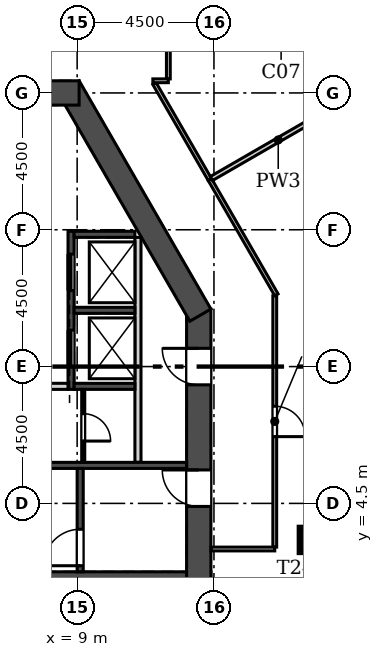
"""IFC4 building model, lengths in metres.
Left out: names, types, materials, properties, quantities, classifications, styles, units other than length and angle.
Written with IfcOpenShell. Run it as: python <this file> out.ifc"""

import sys

from ifc_helpers import new_model, si_unit, direction, frame, frame_2d, origin, origin_2d, place, context, subcontext, project, spatial, rectangle, extrude, element, fill, save


model = new_model("IFC4")
c1 = context("Model", 3, precision=1e-05, world=origin(), true_north=direction((0.0, 1.0)))
c2 = subcontext(c1, "Body", "Model", "MODEL_VIEW")
j1 = project(units=[si_unit("LENGTHUNIT", "METRE"), si_unit("PLANEANGLEUNIT", "RADIAN")], contexts=[c1])
p1 = place(None, origin())
s1 = spatial("IfcSite", under=j1, at=p1, CompositionType="ELEMENT")
p2 = place(p1, origin())
s2 = spatial("IfcBuilding", under=s1, at=p2, CompositionType="ELEMENT")
p3 = place(p2, frame((0.0, 0.0, 335.1)))
s3 = spatial("IfcBuildingStorey", under=s2, at=p3, CompositionType="ELEMENT", Elevation=335.1)
p4 = place(p3, frame((16.721, 3.299, 0.0), z_axis=(0.0, 0.0, 1.0), x_axis=(1.0, 0.0, 0.0)))
e1 = element("IfcColumn", 1, at=p4, inside=s3, PredefinedType="COLUMN", context=c2, shape_type="SweptSolid", body=[
    extrude(rectangle(XDim=0.8, YDim=0.8, at=origin_2d()), origin(), (0.0, 0.0, 1.0), 4.2),
])
p5 = place(p3, frame((-13.4, 1.85, 0.0), z_axis=(0.0, 0.0, 1.0), x_axis=(1.0, 0.0, 0.0)))
e2 = element("IfcWall", 2, at=p5, inside=s3, PredefinedType="SHEAR", context=c2, shape_type="SweptSolid", body=[
    extrude(rectangle(XDim=26.8, YDim=0.8, at=frame_2d((13.4, 0.0))), origin(), (0.0, 0.0, 1.0), 4.2),
])
p6 = place(p3, frame((13.0, 1.45, 0.0), z_axis=(0.0, 0.0, 1.0), x_axis=(0.0, 1.0, 0.0)))
e3 = element("IfcWall", 3, at=p6, inside=s3, PredefinedType="SHEAR", context=c2, shape_type="SweptSolid", body=[
    extrude(rectangle(XDim=9.442, YDim=0.8, at=frame_2d((4.721, 0.0))), origin(), (0.0, 0.0, 1.0), 4.2),
])
p7 = place(p6, frame((2.95, 0.0, 0.0)))
e4 = element("IfcOpeningElement", 4, at=p7, cuts=e3, PredefinedType="OPENING", context=c2, shape_type="SweptSolid", body=[
    extrude(rectangle(XDim=1.2, YDim=2.1, at=frame_2d((0.6, 1.05))), frame((0.0, 0.41, 0.0), z_axis=(0.0, -1.0, 0.0), x_axis=(1.0, 0.0, 0.0)), (0.0, 0.0, 1.0), 0.82),
])
p8 = place(p6, frame((6.95, 0.0, 0.0)))
e5 = element("IfcOpeningElement", 5, at=p8, cuts=e3, PredefinedType="OPENING", context=c2, shape_type="SweptSolid", body=[
    extrude(rectangle(XDim=1.2, YDim=2.1, at=frame_2d((0.6, 1.05))), frame((0.0, 0.41, 0.0), z_axis=(0.0, -1.0, 0.0), x_axis=(1.0, 0.0, 0.0)), (0.0, 0.0, 1.0), 0.82),
])
p9 = place(p3, frame((13.054, 10.692, 0.0), z_axis=(0.0, 0.0, 1.0), x_axis=(-0.500015780397, 0.866016292776, 0.0)))
e6 = element("IfcWall", 6, at=p9, inside=s3, PredefinedType="SHEAR", context=c2, shape_type="SweptSolid", body=[
    extrude(rectangle(XDim=8.67, YDim=0.8, at=frame_2d((4.335, 0.0))), origin(), (0.0, 0.0, 1.0), 4.2),
])
p10 = place(p3, frame((9.065, 18.0, 0.0), z_axis=(0.0, 0.0, 1.0), x_axis=(-1.0, 0.0, 0.0)))
e7 = element("IfcWall", 7, at=p10, inside=s3, PredefinedType="SHEAR", context=c2, shape_type="SweptSolid", body=[
    extrude(rectangle(XDim=18.13, YDim=0.8, at=frame_2d((9.065, 0.0))), origin(), (0.0, 0.0, 1.0), 4.2),
])
p11 = place(p10, frame((8.365, 0.0, 0.0)))
e8 = element("IfcOpeningElement", 8, at=p11, cuts=e7, PredefinedType="OPENING", context=c2, shape_type="SweptSolid", body=[
    extrude(rectangle(XDim=1.4, YDim=2.1, at=frame_2d((0.7, 1.05))), frame((0.0, 0.41, 0.0), z_axis=(0.0, -1.0, 0.0), x_axis=(1.0, 0.0, 0.0)), (0.0, 0.0, 1.0), 0.82),
])
p12 = place(p10, frame((11.065, 0.0, 0.0)))
e9 = element("IfcOpeningElement", 9, at=p12, cuts=e7, PredefinedType="OPENING", context=c2, shape_type="SweptSolid", body=[
    extrude(rectangle(XDim=6.0, YDim=2.4, at=frame_2d((3.0, 1.2))), frame((0.0, 0.41, 0.0), z_axis=(0.0, -1.0, 0.0), x_axis=(1.0, 0.0, 0.0)), (0.0, 0.0, 1.0), 0.82),
])
p13 = place(p10, frame((1.065, 0.0, 0.0)))
e10 = element("IfcOpeningElement", 10, at=p13, cuts=e7, PredefinedType="OPENING", context=c2, shape_type="SweptSolid", body=[
    extrude(rectangle(XDim=6.0, YDim=2.4, at=frame_2d((3.0, 1.2))), frame((0.0, 0.41, 0.0), z_axis=(0.0, -1.0, 0.0), x_axis=(1.0, 0.0, 0.0)), (0.0, 0.0, 1.0), 0.82),
])
p14 = place(p3, frame((23.788, 7.709, 0.0), z_axis=(0.0, 0.0, 1.0), x_axis=(-0.500001731347, 0.866024404189, 0.0)))
e11 = element("IfcWall", 11, at=p14, inside=s3, PredefinedType="SOLIDWALL", context=c2, shape_type="SweptSolid", body=[
    extrude(rectangle(XDim=38.87, YDim=0.34, at=frame_2d((19.435, 0.0))), origin(), (0.0, 0.0, 1.0), 3.8),
])
p15 = place(p14, frame((3.218, 0.0, 0.9)))
e12 = element("IfcOpeningElement", 12, at=p15, cuts=e11, PredefinedType="OPENING", context=c2, shape_type="SweptSolid", body=[
    extrude(rectangle(XDim=1.885, YDim=2.6, at=frame_2d((0.942, 1.3))), frame((0.0, 0.18, 0.0), z_axis=(0.0, -1.0, 0.0), x_axis=(1.0, 0.0, 0.0)), (0.0, 0.0, 1.0), 0.36),
])
p16 = place(p14, frame((6.218, 0.0, 0.9)))
e13 = element("IfcOpeningElement", 13, at=p16, cuts=e11, PredefinedType="OPENING", context=c2, shape_type="SweptSolid", body=[
    extrude(rectangle(XDim=1.885, YDim=2.6, at=frame_2d((0.942, 1.3))), frame((0.0, 0.18, 0.0), z_axis=(0.0, -1.0, 0.0), x_axis=(1.0, 0.0, 0.0)), (0.0, 0.0, 1.0), 0.36),
])
p17 = place(p14, frame((9.218, 0.0, 0.9)))
e14 = element("IfcOpeningElement", 14, at=p17, cuts=e11, PredefinedType="OPENING", context=c2, shape_type="SweptSolid", body=[
    extrude(rectangle(XDim=1.885, YDim=2.6, at=frame_2d((0.942, 1.3))), frame((0.0, 0.18, 0.0), z_axis=(0.0, -1.0, 0.0), x_axis=(1.0, 0.0, 0.0)), (0.0, 0.0, 1.0), 0.36),
])
p18 = place(p14, frame((12.218, 0.0, 0.9)))
e15 = element("IfcOpeningElement", 15, at=p18, cuts=e11, PredefinedType="OPENING", context=c2, shape_type="SweptSolid", body=[
    extrude(rectangle(XDim=1.885, YDim=2.6, at=frame_2d((0.942, 1.3))), frame((0.0, 0.18, 0.0), z_axis=(0.0, -1.0, 0.0), x_axis=(1.0, 0.0, 0.0)), (0.0, 0.0, 1.0), 0.36),
])
p19 = place(p14, frame((15.218, 0.0, 0.9)))
e16 = element("IfcOpeningElement", 16, at=p19, cuts=e11, PredefinedType="OPENING", context=c2, shape_type="SweptSolid", body=[
    extrude(rectangle(XDim=1.885, YDim=2.6, at=frame_2d((0.942, 1.3))), frame((0.0, 0.18, 0.0), z_axis=(0.0, -1.0, 0.0), x_axis=(1.0, 0.0, 0.0)), (0.0, 0.0, 1.0), 0.36),
])
p20 = place(p14, frame((18.218, 0.0, 0.9)))
e17 = element("IfcOpeningElement", 17, at=p20, cuts=e11, PredefinedType="OPENING", context=c2, shape_type="SweptSolid", body=[
    extrude(rectangle(XDim=1.885, YDim=2.6, at=frame_2d((0.942, 1.3))), frame((0.0, 0.18, 0.0), z_axis=(0.0, -1.0, 0.0), x_axis=(1.0, 0.0, 0.0)), (0.0, 0.0, 1.0), 0.36),
])
p21 = place(p14, frame((21.218, 0.0, 0.9)))
e18 = element("IfcOpeningElement", 18, at=p21, cuts=e11, PredefinedType="OPENING", context=c2, shape_type="SweptSolid", body=[
    extrude(rectangle(XDim=1.885, YDim=2.6, at=frame_2d((0.942, 1.3))), frame((0.0, 0.18, 0.0), z_axis=(0.0, -1.0, 0.0), x_axis=(1.0, 0.0, 0.0)), (0.0, 0.0, 1.0), 0.36),
])
p22 = place(p14, frame((24.218, 0.0, 0.9)))
e19 = element("IfcOpeningElement", 19, at=p22, cuts=e11, PredefinedType="OPENING", context=c2, shape_type="SweptSolid", body=[
    extrude(rectangle(XDim=1.885, YDim=2.6, at=frame_2d((0.942, 1.3))), frame((0.0, 0.18, 0.0), z_axis=(0.0, -1.0, 0.0), x_axis=(1.0, 0.0, 0.0)), (0.0, 0.0, 1.0), 0.36),
])
p23 = place(p14, frame((27.218, 0.0, 0.9)))
e20 = element("IfcOpeningElement", 20, at=p23, cuts=e11, PredefinedType="OPENING", context=c2, shape_type="SweptSolid", body=[
    extrude(rectangle(XDim=1.885, YDim=2.6, at=frame_2d((0.942, 1.3))), frame((0.0, 0.18, 0.0), z_axis=(0.0, -1.0, 0.0), x_axis=(1.0, 0.0, 0.0)), (0.0, 0.0, 1.0), 0.36),
])
p24 = place(p14, frame((30.218, 0.0, 0.9)))
e21 = element("IfcOpeningElement", 21, at=p24, cuts=e11, PredefinedType="OPENING", context=c2, shape_type="SweptSolid", body=[
    extrude(rectangle(XDim=1.885, YDim=2.6, at=frame_2d((0.942, 1.3))), frame((0.0, 0.18, 0.0), z_axis=(0.0, -1.0, 0.0), x_axis=(1.0, 0.0, 0.0)), (0.0, 0.0, 1.0), 0.36),
])
p25 = place(p14, frame((33.218, 0.0, 0.9)))
e22 = element("IfcOpeningElement", 22, at=p25, cuts=e11, PredefinedType="OPENING", context=c2, shape_type="SweptSolid", body=[
    extrude(rectangle(XDim=1.885, YDim=2.6, at=frame_2d((0.942, 1.3))), frame((0.0, 0.18, 0.0), z_axis=(0.0, -1.0, 0.0), x_axis=(1.0, 0.0, 0.0)), (0.0, 0.0, 1.0), 0.36),
])
p26 = place(p14, frame((1.051, 0.0, 0.9)))
e23 = element("IfcOpeningElement", 23, at=p26, cuts=e11, PredefinedType="OPENING", context=c2, shape_type="SweptSolid", body=[
    extrude(rectangle(XDim=1.115, YDim=2.4, at=frame_2d((0.558, 1.2))), frame((0.0, 0.18, 0.0), z_axis=(0.0, -1.0, 0.0), x_axis=(1.0, 0.0, 0.0)), (0.0, 0.0, 1.0), 0.36),
])
p27 = place(p14, frame((36.429, 0.0, 0.9)))
e24 = element("IfcOpeningElement", 24, at=p27, cuts=e11, PredefinedType="OPENING", context=c2, shape_type="SweptSolid", body=[
    extrude(rectangle(XDim=1.115, YDim=2.4, at=frame_2d((0.558, 1.2))), frame((0.0, 0.18, 0.0), z_axis=(0.0, -1.0, 0.0), x_axis=(1.0, 0.0, 0.0)), (0.0, 0.0, 1.0), 0.36),
])
p28 = place(p3, frame((11.0, 5.85, 0.0), z_axis=(0.0, 0.0, 1.0), x_axis=(0.0, 1.0, 0.0)))
e25 = element("IfcWall", 25, at=p28, inside=s3, PredefinedType="SOLIDWALL", context=c2, shape_type="SweptSolid", body=[
    extrude(rectangle(XDim=7.4, YDim=0.2, at=frame_2d((3.7, 0.0))), origin(), (0.0, 0.0, 1.0), 3.8),
])
p29 = place(p3, frame((8.8, 8.25, -0.4), z_axis=(0.0, 0.0, 1.0), x_axis=(0.0, 1.0, 0.0)))
e26 = element("IfcWall", 26, at=p29, inside=s3, PredefinedType="SOLIDWALL", context=c2, shape_type="SweptSolid", body=[
    extrude(rectangle(XDim=5.2, YDim=0.2, at=frame_2d((2.6, 0.0))), origin(), (0.0, 0.0, 1.0), 4.2),
])
p30 = place(p29, frame((0.75, 0.0, 0.4)))
e27 = element("IfcOpeningElement", 27, at=p30, cuts=e26, PredefinedType="OPENING", context=c2, shape_type="SweptSolid", body=[
    extrude(rectangle(XDim=1.2, YDim=2.1, at=frame_2d((0.6, 1.05))), frame((0.0, 0.11, 0.0), z_axis=(0.0, -1.0, 0.0), x_axis=(1.0, 0.0, 0.0)), (0.0, 0.0, 1.0), 0.22),
])
p31 = place(p29, frame((3.25, 0.0, 0.4)))
e28 = element("IfcOpeningElement", 28, at=p31, cuts=e26, PredefinedType="OPENING", context=c2, shape_type="SweptSolid", body=[
    extrude(rectangle(XDim=1.2, YDim=2.1, at=frame_2d((0.6, 1.05))), frame((0.0, 0.11, 0.0), z_axis=(0.0, -1.0, 0.0), x_axis=(1.0, 0.0, 0.0)), (0.0, 0.0, 1.0), 0.22),
])
p32 = place(p3, frame((8.9, 8.35, -0.4), z_axis=(0.0, 0.0, 1.0), x_axis=(1.0, 0.0, 0.0)))
e29 = element("IfcWall", 29, at=p32, inside=s3, PredefinedType="SOLIDWALL", context=c2, shape_type="SweptSolid", body=[
    extrude(rectangle(XDim=2.0, YDim=0.2, at=frame_2d((1.0, 0.0))), origin(), (0.0, 0.0, 1.0), 4.2),
])
p33 = place(p3, frame((1.2, 5.75, -0.4), z_axis=(0.0, 0.0, 1.0), x_axis=(1.0, 0.0, 0.0)))
e30 = element("IfcWall", 30, at=p33, inside=s3, PredefinedType="SOLIDWALL", context=c2, shape_type="SweptSolid", body=[
    extrude(rectangle(XDim=11.4, YDim=0.2, at=frame_2d((5.7, 0.0))), origin(), (0.0, 0.0, 1.0), 4.2),
])
p34 = place(p3, frame((9.1, 2.25, -0.4), z_axis=(0.0, 0.0, 1.0), x_axis=(0.0, 1.0, 0.0)))
e31 = element("IfcWall", 31, at=p34, inside=s3, PredefinedType="SOLIDWALL", context=c2, shape_type="SweptSolid", body=[
    extrude(rectangle(XDim=3.4, YDim=0.2, at=frame_2d((1.7, 0.0))), origin(), (0.0, 0.0, 1.0), 4.2),
])
p35 = place(p34, frame((0.2, 0.0, 0.4)))
e32 = element("IfcOpeningElement", 32, at=p35, cuts=e31, PredefinedType="OPENING", context=c2, shape_type="SweptSolid", body=[
    extrude(rectangle(XDim=1.2, YDim=2.1, at=frame_2d((0.6, 1.05))), frame((0.0, 0.11, 0.0), z_axis=(0.0, -1.0, 0.0), x_axis=(1.0, 0.0, 0.0)), (0.0, 0.0, 1.0), 0.22),
])
for number, where, z_axis, x_axis in (
    (33, (8.9, 10.85, -0.4), (0.0, 0.0, 1.0), (1.0, 0.0, 0.0)),
    (34, (8.9, 13.35, -0.4), (0.0, 0.0, 1.0), (1.0, 0.0, 0.0)),
):
    element("IfcWall", number, at=place(p3, frame(where, z_axis=z_axis, x_axis=x_axis)), inside=s3, PredefinedType="SOLIDWALL", context=c2, shape_type="SweptSolid", body=[
        extrude(rectangle(XDim=2.0, YDim=0.2, at=frame_2d((1.0, 0.0))), origin(), (0.0, 0.0, 1.0), 4.2),
    ])
p36 = place(p3, frame((9.2, 5.85, 0.0), z_axis=(0.0, 0.0, 1.0), x_axis=(0.0, 1.0, 0.0)))
e35 = element("IfcWall", 35, at=p36, inside=s3, PredefinedType="PARTITIONING", context=c2, shape_type="SweptSolid", body=[
    extrude(rectangle(XDim=2.4, YDim=0.1, at=frame_2d((1.2, 0.0))), origin(), (0.0, 0.0, 1.0), 3.8),
])
p37 = place(p36, frame((0.7, 0.0, 0.0)))
e36 = element("IfcOpeningElement", 36, at=p37, cuts=e35, PredefinedType="OPENING", context=c2, shape_type="SweptSolid", body=[
    extrude(rectangle(XDim=0.9, YDim=2.1, at=frame_2d((0.45, 1.05))), frame((0.0, 0.06, 0.0), z_axis=(0.0, -1.0, 0.0), x_axis=(1.0, 0.0, 0.0)), (0.0, 0.0, 1.0), 0.12),
])
p38 = place(p3, frame((5.9, 8.35, 0.0), z_axis=(0.0, 0.0, 1.0), x_axis=(1.0, 0.0, 0.0)))
e37 = element("IfcWall", 37, at=p38, inside=s3, PredefinedType="SOLIDWALL", context=c2, shape_type="SweptSolid", body=[
    extrude(rectangle(XDim=2.8, YDim=0.2, at=frame_2d((1.4, 0.0))), origin(), (0.0, 0.0, 1.0), 3.8),
])
p39 = place(p38, frame((0.9, 0.0, 0.0)))
e38 = element("IfcOpeningElement", 38, at=p39, cuts=e37, PredefinedType="OPENING", context=c2, shape_type="SweptSolid", body=[
    extrude(rectangle(XDim=1.0, YDim=2.1, at=frame_2d((0.5, 1.05))), frame((0.0, 0.11, 0.0), z_axis=(0.0, -1.0, 0.0), x_axis=(1.0, 0.0, 0.0)), (0.0, 0.0, 1.0), 0.22),
])
p40 = place(p3, frame((11.544, 18.306, 0.0), z_axis=(0.0, 0.0, 1.0), x_axis=(0.500007048974, -0.866021334019, 0.0)))
e39 = element("IfcWall", 39, at=p40, inside=s3, PredefinedType="PARTITIONING", context=c2, shape_type="SweptSolid", body=[
    extrude(rectangle(XDim=3.639, YDim=0.125, at=frame_2d((1.819, 0.0))), origin(), (0.0, 0.0, 1.0), 3.8),
])
p41 = place(p3, frame((13.364, 15.155, 0.0), z_axis=(0.0, 0.0, 1.0), x_axis=(0.499974900732, -0.866039894369, 0.0)))
e40 = element("IfcWall", 40, at=p41, inside=s3, PredefinedType="PARTITIONING", context=c2, shape_type="SweptSolid", body=[
    extrude(rectangle(XDim=4.381, YDim=0.125, at=frame_2d((2.19, 0.0))), origin(), (0.0, 0.0, 1.0), 3.8),
])
p42 = place(p3, frame((15.5, 11.33, 0.0), z_axis=(0.0, 0.0, 1.0), x_axis=(0.0, -1.0, 0.0)))
e41 = element("IfcWall", 41, at=p42, inside=s3, PredefinedType="PARTITIONING", context=c2, shape_type="SweptSolid", body=[
    extrude(rectangle(XDim=8.267, YDim=0.125, at=frame_2d((4.134, 0.0))), origin(), (0.0, 0.0, 1.0), 3.8),
])
p43 = place(p42, frame((3.634, 0.0, 0.0)))
e42 = element("IfcOpeningElement", 42, at=p43, cuts=e41, PredefinedType="OPENING", context=c2, shape_type="SweptSolid", body=[
    extrude(rectangle(XDim=1.0, YDim=2.1, at=frame_2d((0.5, 1.05))), frame((0.0, 0.073, 0.0), z_axis=(0.0, -1.0, 0.0), x_axis=(1.0, 0.0, 0.0)), (0.0, 0.0, 1.0), 0.145),
])
p44 = place(p3, frame((15.5, 3.0, 0.0), z_axis=(0.0, 0.0, 1.0), x_axis=(-1.0, 0.0, 0.0)))
e43 = element("IfcWall", 43, at=p44, inside=s3, PredefinedType="PARTITIONING", context=c2, shape_type="SweptSolid", body=[
    extrude(rectangle(XDim=2.1, YDim=0.125, at=frame_2d((1.05, 0.0))), origin(), (0.0, 0.0, 1.0), 3.8),
])
p45 = place(p3, frame((12.0, 23.2, 0.0), z_axis=(0.0, 0.0, 1.0), x_axis=(0.0, -1.0, 0.0)))
e44 = element("IfcWall", 44, at=p45, inside=s3, PredefinedType="PARTITIONING", context=c2, shape_type="SweptSolid", body=[
    extrude(rectangle(XDim=4.738, YDim=0.125, at=frame_2d((2.369, 0.0))), origin(), (0.0, 0.0, 1.0), 3.8),
])
p46 = place(p3, frame((12.0, 18.4, 0.0), z_axis=(0.0, 0.0, 1.0), x_axis=(-1.0, 0.0, 0.0)))
e45 = element("IfcWall", 45, at=p46, inside=s3, PredefinedType="PARTITIONING", context=c2, shape_type="SweptSolid", body=[
    extrude(rectangle(XDim=0.51, YDim=0.125, at=frame_2d((0.255, 0.0))), origin(), (0.0, 0.0, 1.0), 3.8),
])
p47 = place(p3, frame((17.811, 17.722, 0.0), z_axis=(0.0, 0.0, 1.0), x_axis=(-0.86601005171, -0.50002658963, 0.0)))
e46 = element("IfcWall", 46, at=p47, inside=s3, PredefinedType="PARTITIONING", context=c2, shape_type="SweptSolid", body=[
    extrude(rectangle(XDim=5.073, YDim=0.15, at=frame_2d((2.536, 0.0))), origin(), (0.0, 0.0, 1.0), 3.8),
])
p48 = place(p30, origin())
e47 = element("IfcDoor", 47, at=p48, inside=s3, OperationType="SLIDING_TO_LEFT", PredefinedType="DOOR", context=c2, shape_type="SweptSolid", body=[
    extrude(rectangle(XDim=1.2, YDim=2.1, at=frame_2d((0.6, 1.05))), frame((0.0, 0.025, 0.0), z_axis=(0.0, -1.0, 0.0), x_axis=(1.0, 0.0, 0.0)), (0.0, 0.0, 1.0), 0.05),
])
fill(e27, e47)
p49 = place(p31, origin())
e48 = element("IfcDoor", 48, at=p49, inside=s3, OperationType="SLIDING_TO_LEFT", PredefinedType="DOOR", context=c2, shape_type="SweptSolid", body=[
    extrude(rectangle(XDim=1.2, YDim=2.1, at=frame_2d((0.6, 1.05))), frame((0.0, 0.025, 0.0), z_axis=(0.0, -1.0, 0.0), x_axis=(1.0, 0.0, 0.0)), (0.0, 0.0, 1.0), 0.05),
])
fill(e28, e48)
p50 = place(p37, frame((0.9, 0.0, 0.0), z_axis=(0.0, 0.0, 1.0), x_axis=(-1.0, 0.0, 0.0)))
e49 = element("IfcDoor", 49, at=p50, inside=s3, OperationType="SINGLE_SWING_RIGHT", PredefinedType="DOOR", context=c2, shape_type="SweptSolid", body=[
    extrude(rectangle(XDim=0.9, YDim=2.1, at=frame_2d((0.45, 1.05))), frame((0.0, 0.025, 0.0), z_axis=(0.0, -1.0, 0.0), x_axis=(1.0, 0.0, 0.0)), (0.0, 0.0, 1.0), 0.05),
])
fill(e36, e49)
p51 = place(p7, origin())
e50 = element("IfcDoor", 50, at=p51, inside=s3, OperationType="SINGLE_SWING_RIGHT", PredefinedType="DOOR", context=c2, shape_type="SweptSolid", body=[
    extrude(rectangle(XDim=1.2, YDim=2.1, at=frame_2d((0.6, 1.05))), frame((0.0, 0.025, 0.0), z_axis=(0.0, -1.0, 0.0), x_axis=(1.0, 0.0, 0.0)), (0.0, 0.0, 1.0), 0.05),
])
fill(e4, e50)
p52 = place(p35, origin())
e51 = element("IfcDoor", 51, at=p52, inside=s3, OperationType="SINGLE_SWING_LEFT", PredefinedType="DOOR", context=c2, shape_type="SweptSolid", body=[
    extrude(rectangle(XDim=1.2, YDim=2.1, at=frame_2d((0.6, 1.05))), frame((0.0, 0.025, 0.0), z_axis=(0.0, -1.0, 0.0), x_axis=(1.0, 0.0, 0.0)), (0.0, 0.0, 1.0), 0.05),
])
fill(e32, e51)
p53 = place(p8, origin())
e52 = element("IfcDoor", 52, at=p53, inside=s3, OperationType="SINGLE_SWING_RIGHT", PredefinedType="DOOR", context=c2, shape_type="SweptSolid", body=[
    extrude(rectangle(XDim=1.2, YDim=2.1, at=frame_2d((0.6, 1.05))), frame((0.0, 0.025, 0.0), z_axis=(0.0, -1.0, 0.0), x_axis=(1.0, 0.0, 0.0)), (0.0, 0.0, 1.0), 0.05),
])
fill(e5, e52)
p54 = place(p43, origin())
e53 = element("IfcDoor", 53, at=p54, inside=s3, OperationType="SINGLE_SWING_RIGHT", PredefinedType="DOOR", context=c2, shape_type="SweptSolid", body=[
    extrude(rectangle(XDim=1.0, YDim=2.1, at=frame_2d((0.5, 1.05))), frame((0.0, 0.025, 0.0), z_axis=(0.0, -1.0, 0.0), x_axis=(1.0, 0.0, 0.0)), (0.0, 0.0, 1.0), 0.05),
])
fill(e42, e53)
save(model, sys.argv[1])
